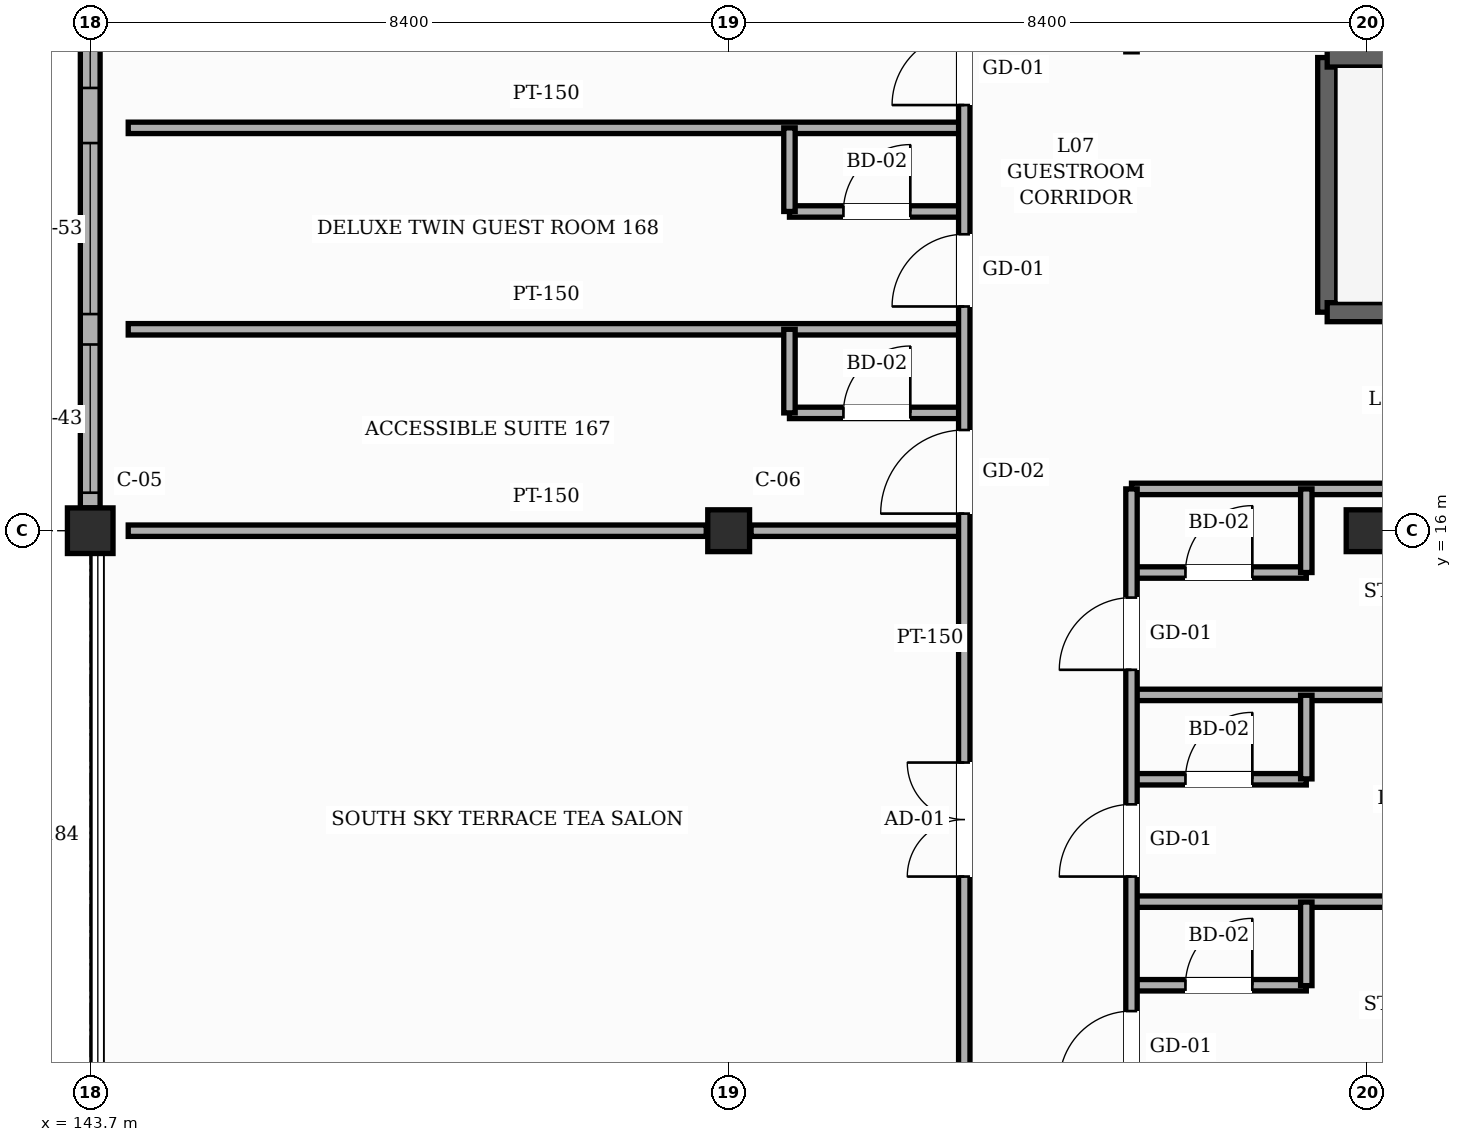
"""IFC4 building model, lengths in metres.
Left out: names, types, materials, properties, quantities, classifications, styles, units other than length and angle.
Written with IfcOpenShell. Run it as: python <this file> out.ifc"""

import sys

from ifc_helpers import new_model, si_unit, direction, frame, frame_2d, origin, origin_2d, place, context, subcontext, project, spatial, rectangle, hollow_rectangle, extrude, element, fill, save


model = new_model("IFC4")
c1 = context("Model", 3, precision=1e-05, world=origin(), true_north=direction((0.0, 1.0)))
c2 = subcontext(c1, "Body", "Model", "MODEL_VIEW")
j1 = project(units=[si_unit("LENGTHUNIT", "METRE"), si_unit("PLANEANGLEUNIT", "RADIAN")], contexts=[c1])
p1 = place(None, origin())
s1 = spatial("IfcSite", under=j1, at=p1, CompositionType="ELEMENT")
p2 = place(p1, origin())
s2 = spatial("IfcBuilding", under=s1, at=p2, CompositionType="ELEMENT")
p3 = place(p2, frame((0.0, 0.0, 31.8)))
s3 = spatial("IfcBuildingStorey", under=s2, at=p3, CompositionType="ELEMENT", Elevation=31.8)
p4 = place(p3, frame((143.7, 16.0, 0.0), z_axis=(0.0, 0.0, 1.0), x_axis=(1.0, 0.0, 0.0)))
e1 = element("IfcColumn", 1, at=p4, inside=s3, PredefinedType="COLUMN", context=c2, shape_type="SweptSolid", body=[
    extrude(hollow_rectangle(XDim=0.6, YDim=0.6, WallThickness=0.025, InnerFilletRadius=0.025, OuterFilletRadius=0.05, at=origin_2d()), origin(), (0.0, 0.0, 1.0), 3.6),
])
for number, where, z_axis, x_axis in (
    (2, (152.1, 16.0, 0.0), (0.0, 0.0, 1.0), (1.0, 0.0, 0.0)),
    (3, (160.5, 16.0, 0.0), (0.0, 0.0, 1.0), (1.0, 0.0, 0.0)),
):
    element("IfcColumn", number, at=place(p3, frame(where, z_axis=z_axis, x_axis=x_axis)), inside=s3, PredefinedType="COLUMN", context=c2, shape_type="SweptSolid", body=[
        extrude(hollow_rectangle(XDim=0.55, YDim=0.55, WallThickness=0.022, InnerFilletRadius=0.022, OuterFilletRadius=0.044, at=origin_2d()), origin(), (0.0, 0.0, 1.0), 3.6),
    ])
p5 = place(p3, frame((143.7, 16.3, 0.0), z_axis=(0.0, 0.0, 1.0), x_axis=(0.0, 1.0, 0.0)))
e4 = element("IfcWall", 4, at=p5, inside=s3, PredefinedType="SOLIDWALL", context=c2, shape_type="SweptSolid", body=[
    extrude(rectangle(XDim=7.4, YDim=0.26, at=frame_2d((3.7, 0.0))), origin(), (0.0, 0.0, 1.0), 2.805),
])
p6 = place(p5, frame((0.2, 0.0, 0.85)))
e5 = element("IfcOpeningElement", 5, at=p6, cuts=e4, PredefinedType="OPENING", context=c2, shape_type="SweptSolid", body=[
    extrude(rectangle(XDim=1.95, YDim=1.65, at=frame_2d((0.975, 0.825))), frame((0.0, 0.14, 0.0), z_axis=(0.0, -1.0, 0.0), x_axis=(1.0, 0.0, 0.0)), (0.0, 0.0, 1.0), 0.28),
])
p7 = place(p5, frame((2.55, 0.0, 0.85)))
e6 = element("IfcOpeningElement", 6, at=p7, cuts=e4, PredefinedType="OPENING", context=c2, shape_type="SweptSolid", body=[
    extrude(rectangle(XDim=2.25, YDim=1.65, at=frame_2d((1.125, 0.825))), frame((0.0, 0.14, 0.0), z_axis=(0.0, -1.0, 0.0), x_axis=(1.0, 0.0, 0.0)), (0.0, 0.0, 1.0), 0.28),
])
p8 = place(p5, frame((5.525, 0.0, 0.85)))
e7 = element("IfcOpeningElement", 7, at=p8, cuts=e4, PredefinedType="OPENING", context=c2, shape_type="SweptSolid", body=[
    extrude(rectangle(XDim=1.35, YDim=1.35, at=frame_2d((0.675, 0.675))), frame((0.0, 0.14, 0.0), z_axis=(0.0, -1.0, 0.0), x_axis=(1.0, 0.0, 0.0)), (0.0, 0.0, 1.0), 0.28),
])
p9 = place(p3, frame((159.975, 18.875, 0.0), z_axis=(0.0, 0.0, 1.0), x_axis=(0.0, 1.0, 0.0)))
e8 = element("IfcWall", 8, at=p9, inside=s3, PredefinedType="SHEAR", context=c2, shape_type="SweptSolid", body=[
    extrude(rectangle(XDim=3.35, YDim=0.25, at=frame_2d((1.675, 0.0))), origin(), (0.0, 0.0, 1.0), 3.38),
])
p10 = place(p3, frame((159.975, 22.225, 0.0), z_axis=(0.0, 0.0, 1.0), x_axis=(1.0, 0.0, 0.0)))
e9 = element("IfcWall", 9, at=p10, inside=s3, PredefinedType="SHEAR", context=c2, shape_type="SweptSolid", body=[
    extrude(rectangle(XDim=7.9, YDim=0.25, at=frame_2d((3.95, 0.0))), origin(), (0.0, 0.0, 1.0), 3.38),
])
p11 = place(p10, frame((6.075, 0.0, 0.0)))
e10 = element("IfcOpeningElement", 10, at=p11, cuts=e9, PredefinedType="OPENING", context=c2, shape_type="SweptSolid", body=[
    extrude(rectangle(XDim=1.3, YDim=2.2, at=frame_2d((0.65, 1.1))), frame((0.0, 0.135, 0.0), z_axis=(0.0, -1.0, 0.0), x_axis=(1.0, 0.0, 0.0)), (0.0, 0.0, 1.0), 0.27),
])
p12 = place(p3, frame((167.875, 18.875, 0.0), z_axis=(0.0, 0.0, 1.0), x_axis=(-1.0, 0.0, 0.0)))
e11 = element("IfcWall", 11, at=p12, inside=s3, PredefinedType="SHEAR", context=c2, shape_type="SweptSolid", body=[
    extrude(rectangle(XDim=7.9, YDim=0.25, at=frame_2d((3.95, 0.0))), origin(), (0.0, 0.0, 1.0), 3.38),
])
p13 = place(p3, frame((157.4, 10.02, 0.0), z_axis=(0.0, 0.0, 1.0), x_axis=(1.0, 0.0, 0.0)))
e12 = element("IfcWall", 12, at=p13, inside=s3, PredefinedType="PARTITIONING", context=c2, shape_type="SweptSolid", body=[
    extrude(rectangle(XDim=2.3, YDim=0.15, at=frame_2d((1.15, 0.0))), origin(), (0.0, 0.0, 1.0), 3.365),
])
p14 = place(p13, frame((0.71, 0.0, 0.0)))
e13 = element("IfcOpeningElement", 13, at=p14, cuts=e12, PredefinedType="OPENING", context=c2, shape_type="SweptSolid", body=[
    extrude(rectangle(XDim=0.88, YDim=2.12, at=frame_2d((0.44, 1.06))), frame((0.0, 0.085, 0.0), z_axis=(0.0, -1.0, 0.0), x_axis=(1.0, 0.0, 0.0)), (0.0, 0.0, 1.0), 0.17),
])
p15 = place(p3, frame((157.4, 11.12, 0.0), z_axis=(0.0, 0.0, 1.0), x_axis=(1.0, 0.0, 0.0)))
e14 = element("IfcWall", 14, at=p15, inside=s3, PredefinedType="PARTITIONING", context=c2, shape_type="SweptSolid", body=[
    extrude(rectangle(XDim=9.8, YDim=0.15, at=frame_2d((4.9, 0.0))), origin(), (0.0, 0.0, 1.0), 3.365),
])
p16 = place(p3, frame((157.4, 12.73, 0.0), z_axis=(0.0, 0.0, 1.0), x_axis=(1.0, 0.0, 0.0)))
e15 = element("IfcWall", 15, at=p16, inside=s3, PredefinedType="PARTITIONING", context=c2, shape_type="SweptSolid", body=[
    extrude(rectangle(XDim=2.3, YDim=0.15, at=frame_2d((1.15, 0.0))), origin(), (0.0, 0.0, 1.0), 3.365),
])
p17 = place(p16, frame((0.71, 0.0, 0.0)))
e16 = element("IfcOpeningElement", 16, at=p17, cuts=e15, PredefinedType="OPENING", context=c2, shape_type="SweptSolid", body=[
    extrude(rectangle(XDim=0.88, YDim=2.12, at=frame_2d((0.44, 1.06))), frame((0.0, 0.085, 0.0), z_axis=(0.0, -1.0, 0.0), x_axis=(1.0, 0.0, 0.0)), (0.0, 0.0, 1.0), 0.17),
])
p18 = place(p3, frame((157.4, 13.84, 0.0), z_axis=(0.0, 0.0, 1.0), x_axis=(1.0, 0.0, 0.0)))
e17 = element("IfcWall", 17, at=p18, inside=s3, PredefinedType="PARTITIONING", context=c2, shape_type="SweptSolid", body=[
    extrude(rectangle(XDim=9.8, YDim=0.15, at=frame_2d((4.9, 0.0))), origin(), (0.0, 0.0, 1.0), 3.365),
])
p19 = place(p3, frame((157.4, 15.45, 0.0), z_axis=(0.0, 0.0, 1.0), x_axis=(1.0, 0.0, 0.0)))
e18 = element("IfcWall", 18, at=p19, inside=s3, PredefinedType="PARTITIONING", context=c2, shape_type="SweptSolid", body=[
    extrude(rectangle(XDim=2.3, YDim=0.15, at=frame_2d((1.15, 0.0))), origin(), (0.0, 0.0, 1.0), 3.365),
])
p20 = place(p19, frame((0.71, 0.0, 0.0)))
e19 = element("IfcOpeningElement", 19, at=p20, cuts=e18, PredefinedType="OPENING", context=c2, shape_type="SweptSolid", body=[
    extrude(rectangle(XDim=0.88, YDim=2.12, at=frame_2d((0.44, 1.06))), frame((0.0, 0.085, 0.0), z_axis=(0.0, -1.0, 0.0), x_axis=(1.0, 0.0, 0.0)), (0.0, 0.0, 1.0), 0.17),
])
p21 = place(p3, frame((144.2, 16.0, 0.0), z_axis=(0.0, 0.0, 1.0), x_axis=(1.0, 0.0, 0.0)))
e20 = element("IfcWall", 20, at=p21, inside=s3, PredefinedType="PARTITIONING", context=c2, shape_type="SweptSolid", body=[
    extrude(rectangle(XDim=7.605, YDim=0.15, at=frame_2d((3.802, 0.0))), origin(), (0.0, 0.0, 1.0), 2.755),
])
p22 = place(p3, frame((152.395, 16.0, 0.0), z_axis=(0.0, 0.0, 1.0), x_axis=(1.0, 0.0, 0.0)))
e21 = element("IfcWall", 21, at=p22, inside=s3, PredefinedType="PARTITIONING", context=c2, shape_type="SweptSolid", body=[
    extrude(rectangle(XDim=2.805, YDim=0.15, at=frame_2d((1.402, 0.0))), origin(), (0.0, 0.0, 1.0), 2.755),
])
p23 = place(p3, frame((157.4, 16.55, 0.0), z_axis=(0.0, 0.0, 1.0), x_axis=(1.0, 0.0, 0.0)))
e22 = element("IfcWall", 22, at=p23, inside=s3, PredefinedType="PARTITIONING", context=c2, shape_type="SweptSolid", body=[
    extrude(rectangle(XDim=9.8, YDim=0.15, at=frame_2d((4.9, 0.0))), origin(), (0.0, 0.0, 1.0), 3.365),
])
p24 = place(p3, frame((152.9, 17.55, 0.0), z_axis=(0.0, 0.0, 1.0), x_axis=(1.0, 0.0, 0.0)))
e23 = element("IfcWall", 23, at=p24, inside=s3, PredefinedType="PARTITIONING", context=c2, shape_type="SweptSolid", body=[
    extrude(rectangle(XDim=2.3, YDim=0.15, at=frame_2d((1.15, 0.0))), origin(), (0.0, 0.0, 1.0), 3.365),
])
p25 = place(p24, frame((0.71, 0.0, 0.0)))
e24 = element("IfcOpeningElement", 24, at=p25, cuts=e23, PredefinedType="OPENING", context=c2, shape_type="SweptSolid", body=[
    extrude(rectangle(XDim=0.88, YDim=2.12, at=frame_2d((0.44, 1.06))), frame((0.0, 0.085, 0.0), z_axis=(0.0, -1.0, 0.0), x_axis=(1.0, 0.0, 0.0)), (0.0, 0.0, 1.0), 0.17),
])
p26 = place(p3, frame((144.2, 18.65, 0.0), z_axis=(0.0, 0.0, 1.0), x_axis=(1.0, 0.0, 0.0)))
e25 = element("IfcWall", 25, at=p26, inside=s3, PredefinedType="PARTITIONING", context=c2, shape_type="SweptSolid", body=[
    extrude(rectangle(XDim=11.0, YDim=0.15, at=frame_2d((5.5, 0.0))), origin(), (0.0, 0.0, 1.0), 3.365),
])
p27 = place(p3, frame((152.9, 20.2, 0.0), z_axis=(0.0, 0.0, 1.0), x_axis=(1.0, 0.0, 0.0)))
e26 = element("IfcWall", 26, at=p27, inside=s3, PredefinedType="PARTITIONING", context=c2, shape_type="SweptSolid", body=[
    extrude(rectangle(XDim=2.3, YDim=0.15, at=frame_2d((1.15, 0.0))), origin(), (0.0, 0.0, 1.0), 3.365),
])
p28 = place(p27, frame((0.71, 0.0, 0.0)))
e27 = element("IfcOpeningElement", 27, at=p28, cuts=e26, PredefinedType="OPENING", context=c2, shape_type="SweptSolid", body=[
    extrude(rectangle(XDim=0.88, YDim=2.12, at=frame_2d((0.44, 1.06))), frame((0.0, 0.085, 0.0), z_axis=(0.0, -1.0, 0.0), x_axis=(1.0, 0.0, 0.0)), (0.0, 0.0, 1.0), 0.17),
])
p29 = place(p3, frame((144.2, 21.3, 0.0), z_axis=(0.0, 0.0, 1.0), x_axis=(1.0, 0.0, 0.0)))
e28 = element("IfcWall", 28, at=p29, inside=s3, PredefinedType="PARTITIONING", context=c2, shape_type="SweptSolid", body=[
    extrude(rectangle(XDim=11.0, YDim=0.15, at=frame_2d((5.5, 0.0))), origin(), (0.0, 0.0, 1.0), 3.365),
])
p30 = place(p3, frame((152.9, 17.55, 0.0), z_axis=(0.0, 0.0, 1.0), x_axis=(0.0, 1.0, 0.0)))
e29 = element("IfcWall", 29, at=p30, inside=s3, PredefinedType="PARTITIONING", context=c2, shape_type="SweptSolid", body=[
    extrude(rectangle(XDim=1.1, YDim=0.15, at=frame_2d((0.55, 0.0))), origin(), (0.0, 0.0, 1.0), 3.365),
])
p31 = place(p3, frame((152.9, 20.2, 0.0), z_axis=(0.0, 0.0, 1.0), x_axis=(0.0, 1.0, 0.0)))
e30 = element("IfcWall", 30, at=p31, inside=s3, PredefinedType="PARTITIONING", context=c2, shape_type="SweptSolid", body=[
    extrude(rectangle(XDim=1.1, YDim=0.15, at=frame_2d((0.55, 0.0))), origin(), (0.0, 0.0, 1.0), 3.365),
])
p32 = place(p3, frame((155.2, 8.4, 0.0), z_axis=(0.0, 0.0, 1.0), x_axis=(0.0, 1.0, 0.0)))
e31 = element("IfcWall", 31, at=p32, inside=s3, PredefinedType="PARTITIONING", context=c2, shape_type="SweptSolid", body=[
    extrude(rectangle(XDim=18.2, YDim=0.15, at=frame_2d((9.1, 0.0))), origin(), (0.0, 0.0, 1.0), 3.365),
])
p33 = place(p32, frame((3.05, 0.0, 0.0)))
e32 = element("IfcOpeningElement", 32, at=p33, cuts=e31, PredefinedType="OPENING", context=c2, shape_type="SweptSolid", body=[
    extrude(rectangle(XDim=1.5, YDim=2.3, at=frame_2d((0.75, 1.15))), frame((0.0, 0.085, 0.0), z_axis=(0.0, -1.0, 0.0), x_axis=(1.0, 0.0, 0.0)), (0.0, 0.0, 1.0), 0.17),
])
p34 = place(p32, frame((7.825, 0.0, 0.0)))
e33 = element("IfcOpeningElement", 33, at=p34, cuts=e31, PredefinedType="OPENING", context=c2, shape_type="SweptSolid", body=[
    extrude(rectangle(XDim=1.1, YDim=2.2, at=frame_2d((0.55, 1.1))), frame((0.0, 0.085, 0.0), z_axis=(0.0, -1.0, 0.0), x_axis=(1.0, 0.0, 0.0)), (0.0, 0.0, 1.0), 0.17),
])
p35 = place(p32, frame((10.55, 0.0, 0.0)))
e34 = element("IfcOpeningElement", 34, at=p35, cuts=e31, PredefinedType="OPENING", context=c2, shape_type="SweptSolid", body=[
    extrude(rectangle(XDim=0.95, YDim=2.15, at=frame_2d((0.475, 1.075))), frame((0.0, 0.085, 0.0), z_axis=(0.0, -1.0, 0.0), x_axis=(1.0, 0.0, 0.0)), (0.0, 0.0, 1.0), 0.17),
])
p36 = place(p32, frame((13.2, 0.0, 0.0)))
e35 = element("IfcOpeningElement", 35, at=p36, cuts=e31, PredefinedType="OPENING", context=c2, shape_type="SweptSolid", body=[
    extrude(rectangle(XDim=0.95, YDim=2.15, at=frame_2d((0.475, 1.075))), frame((0.0, 0.085, 0.0), z_axis=(0.0, -1.0, 0.0), x_axis=(1.0, 0.0, 0.0)), (0.0, 0.0, 1.0), 0.17),
])
p37 = place(p32, frame((15.85, 0.0, 0.0)))
e36 = element("IfcOpeningElement", 36, at=p37, cuts=e31, PredefinedType="OPENING", context=c2, shape_type="SweptSolid", body=[
    extrude(rectangle(XDim=0.95, YDim=2.15, at=frame_2d((0.475, 1.075))), frame((0.0, 0.085, 0.0), z_axis=(0.0, -1.0, 0.0), x_axis=(1.0, 0.0, 0.0)), (0.0, 0.0, 1.0), 0.17),
])
p38 = place(p3, frame((157.4, 8.4, 0.0), z_axis=(0.0, 0.0, 1.0), x_axis=(0.0, 1.0, 0.0)))
e37 = element("IfcWall", 37, at=p38, inside=s3, PredefinedType="PARTITIONING", context=c2, shape_type="SweptSolid", body=[
    extrude(rectangle(XDim=8.15, YDim=0.15, at=frame_2d((4.075, 0.0))), origin(), (0.0, 0.0, 1.0), 3.365),
])
p39 = place(p38, frame((0.33, 0.0, 0.0)))
e38 = element("IfcOpeningElement", 38, at=p39, cuts=e37, PredefinedType="OPENING", context=c2, shape_type="SweptSolid", body=[
    extrude(rectangle(XDim=0.95, YDim=2.15, at=frame_2d((0.475, 1.075))), frame((0.0, 0.085, 0.0), z_axis=(0.0, -1.0, 0.0), x_axis=(1.0, 0.0, 0.0)), (0.0, 0.0, 1.0), 0.17),
])
p40 = place(p38, frame((3.05, 0.0, 0.0)))
e39 = element("IfcOpeningElement", 39, at=p40, cuts=e37, PredefinedType="OPENING", context=c2, shape_type="SweptSolid", body=[
    extrude(rectangle(XDim=0.95, YDim=2.15, at=frame_2d((0.475, 1.075))), frame((0.0, 0.085, 0.0), z_axis=(0.0, -1.0, 0.0), x_axis=(1.0, 0.0, 0.0)), (0.0, 0.0, 1.0), 0.17),
])
p41 = place(p38, frame((5.77, 0.0, 0.0)))
e40 = element("IfcOpeningElement", 40, at=p41, cuts=e37, PredefinedType="OPENING", context=c2, shape_type="SweptSolid", body=[
    extrude(rectangle(XDim=0.95, YDim=2.15, at=frame_2d((0.475, 1.075))), frame((0.0, 0.085, 0.0), z_axis=(0.0, -1.0, 0.0), x_axis=(1.0, 0.0, 0.0)), (0.0, 0.0, 1.0), 0.17),
])
p42 = place(p3, frame((159.7, 10.015, 0.0), z_axis=(0.0, 0.0, 1.0), x_axis=(0.0, 1.0, 0.0)))
e41 = element("IfcWall", 41, at=p42, inside=s3, PredefinedType="PARTITIONING", context=c2, shape_type="SweptSolid", body=[
    extrude(rectangle(XDim=1.1, YDim=0.15, at=frame_2d((0.55, 0.0))), origin(), (0.0, 0.0, 1.0), 3.365),
])
p43 = place(p3, frame((159.7, 12.735, 0.0), z_axis=(0.0, 0.0, 1.0), x_axis=(0.0, 1.0, 0.0)))
e42 = element("IfcWall", 42, at=p43, inside=s3, PredefinedType="PARTITIONING", context=c2, shape_type="SweptSolid", body=[
    extrude(rectangle(XDim=1.1, YDim=0.15, at=frame_2d((0.55, 0.0))), origin(), (0.0, 0.0, 1.0), 3.365),
])
p44 = place(p3, frame((159.7, 15.45, 0.0), z_axis=(0.0, 0.0, 1.0), x_axis=(0.0, 1.0, 0.0)))
e43 = element("IfcWall", 43, at=p44, inside=s3, PredefinedType="PARTITIONING", context=c2, shape_type="SweptSolid", body=[
    extrude(rectangle(XDim=1.1, YDim=0.15, at=frame_2d((0.55, 0.0))), origin(), (0.0, 0.0, 1.0), 3.365),
])
p45 = place(p6, origin())
e44 = element("IfcWindow", 44, at=p45, inside=s3, PartitioningType="SINGLE_PANEL", PredefinedType="WINDOW", context=c2, shape_type="SweptSolid", body=[
    extrude(rectangle(XDim=1.95, YDim=1.65, at=frame_2d((0.975, 0.825))), frame((0.0, 0.03, 0.0), z_axis=(0.0, -1.0, 0.0), x_axis=(1.0, 0.0, 0.0)), (0.0, 0.0, 1.0), 0.06),
])
fill(e5, e44)
p46 = place(p7, origin())
e45 = element("IfcWindow", 45, at=p46, inside=s3, PartitioningType="SINGLE_PANEL", PredefinedType="WINDOW", context=c2, shape_type="SweptSolid", body=[
    extrude(rectangle(XDim=2.25, YDim=1.65, at=frame_2d((1.125, 0.825))), frame((0.0, 0.03, 0.0), z_axis=(0.0, -1.0, 0.0), x_axis=(1.0, 0.0, 0.0)), (0.0, 0.0, 1.0), 0.06),
])
fill(e6, e45)
p47 = place(p8, origin())
e46 = element("IfcWindow", 46, at=p47, inside=s3, PartitioningType="SINGLE_PANEL", PredefinedType="WINDOW", context=c2, shape_type="SweptSolid", body=[
    extrude(rectangle(XDim=1.35, YDim=1.35, at=frame_2d((0.675, 0.675))), frame((0.0, 0.03, 0.0), z_axis=(0.0, -1.0, 0.0), x_axis=(1.0, 0.0, 0.0)), (0.0, 0.0, 1.0), 0.06),
])
fill(e7, e46)
p48 = place(p33, origin())
e47 = element("IfcDoor", 47, at=p48, inside=s3, OperationType="DOUBLE_DOOR_SINGLE_SWING", PredefinedType="DOOR", context=c2, shape_type="SweptSolid", body=[
    extrude(rectangle(XDim=1.5, YDim=2.3, at=frame_2d((0.75, 1.15))), frame((0.0, 0.025, 0.0), z_axis=(0.0, -1.0, 0.0), x_axis=(1.0, 0.0, 0.0)), (0.0, 0.0, 1.0), 0.05),
])
fill(e32, e47)
p49 = place(p34, origin())
e48 = element("IfcDoor", 48, at=p49, inside=s3, OperationType="SINGLE_SWING_LEFT", PredefinedType="DOOR", context=c2, shape_type="SweptSolid", body=[
    extrude(rectangle(XDim=1.1, YDim=2.2, at=frame_2d((0.55, 1.1))), frame((0.0, 0.025, 0.0), z_axis=(0.0, -1.0, 0.0), x_axis=(1.0, 0.0, 0.0)), (0.0, 0.0, 1.0), 0.05),
])
fill(e33, e48)
p50 = place(p25, origin())
e49 = element("IfcDoor", 49, at=p50, inside=s3, OperationType="SINGLE_SWING_RIGHT", PredefinedType="DOOR", context=c2, shape_type="SweptSolid", body=[
    extrude(rectangle(XDim=0.88, YDim=2.12, at=frame_2d((0.44, 1.06))), frame((0.0, 0.025, 0.0), z_axis=(0.0, -1.0, 0.0), x_axis=(1.0, 0.0, 0.0)), (0.0, 0.0, 1.0), 0.05),
])
fill(e24, e49)
p51 = place(p35, origin())
e50 = element("IfcDoor", 50, at=p51, inside=s3, OperationType="SINGLE_SWING_LEFT", PredefinedType="DOOR", context=c2, shape_type="SweptSolid", body=[
    extrude(rectangle(XDim=0.95, YDim=2.15, at=frame_2d((0.475, 1.075))), frame((0.0, 0.025, 0.0), z_axis=(0.0, -1.0, 0.0), x_axis=(1.0, 0.0, 0.0)), (0.0, 0.0, 1.0), 0.05),
])
fill(e34, e50)
p52 = place(p28, origin())
e51 = element("IfcDoor", 51, at=p52, inside=s3, OperationType="SINGLE_SWING_RIGHT", PredefinedType="DOOR", context=c2, shape_type="SweptSolid", body=[
    extrude(rectangle(XDim=0.88, YDim=2.12, at=frame_2d((0.44, 1.06))), frame((0.0, 0.025, 0.0), z_axis=(0.0, -1.0, 0.0), x_axis=(1.0, 0.0, 0.0)), (0.0, 0.0, 1.0), 0.05),
])
fill(e27, e51)
p53 = place(p36, origin())
e52 = element("IfcDoor", 52, at=p53, inside=s3, OperationType="SINGLE_SWING_LEFT", PredefinedType="DOOR", context=c2, shape_type="SweptSolid", body=[
    extrude(rectangle(XDim=0.95, YDim=2.15, at=frame_2d((0.475, 1.075))), frame((0.0, 0.025, 0.0), z_axis=(0.0, -1.0, 0.0), x_axis=(1.0, 0.0, 0.0)), (0.0, 0.0, 1.0), 0.05),
])
fill(e35, e52)
p54 = place(p39, origin())
e53 = element("IfcDoor", 53, at=p54, inside=s3, OperationType="SINGLE_SWING_LEFT", PredefinedType="DOOR", context=c2, shape_type="SweptSolid", body=[
    extrude(rectangle(XDim=0.95, YDim=2.15, at=frame_2d((0.475, 1.075))), frame((0.0, 0.025, 0.0), z_axis=(0.0, -1.0, 0.0), x_axis=(1.0, 0.0, 0.0)), (0.0, 0.0, 1.0), 0.05),
])
fill(e38, e53)
p55 = place(p14, origin())
e54 = element("IfcDoor", 54, at=p55, inside=s3, OperationType="SINGLE_SWING_RIGHT", PredefinedType="DOOR", context=c2, shape_type="SweptSolid", body=[
    extrude(rectangle(XDim=0.88, YDim=2.12, at=frame_2d((0.44, 1.06))), frame((0.0, 0.025, 0.0), z_axis=(0.0, -1.0, 0.0), x_axis=(1.0, 0.0, 0.0)), (0.0, 0.0, 1.0), 0.05),
])
fill(e13, e54)
p56 = place(p40, origin())
e55 = element("IfcDoor", 55, at=p56, inside=s3, OperationType="SINGLE_SWING_LEFT", PredefinedType="DOOR", context=c2, shape_type="SweptSolid", body=[
    extrude(rectangle(XDim=0.95, YDim=2.15, at=frame_2d((0.475, 1.075))), frame((0.0, 0.025, 0.0), z_axis=(0.0, -1.0, 0.0), x_axis=(1.0, 0.0, 0.0)), (0.0, 0.0, 1.0), 0.05),
])
fill(e39, e55)
p57 = place(p17, origin())
e56 = element("IfcDoor", 56, at=p57, inside=s3, OperationType="SINGLE_SWING_RIGHT", PredefinedType="DOOR", context=c2, shape_type="SweptSolid", body=[
    extrude(rectangle(XDim=0.88, YDim=2.12, at=frame_2d((0.44, 1.06))), frame((0.0, 0.025, 0.0), z_axis=(0.0, -1.0, 0.0), x_axis=(1.0, 0.0, 0.0)), (0.0, 0.0, 1.0), 0.05),
])
fill(e16, e56)
p58 = place(p41, origin())
e57 = element("IfcDoor", 57, at=p58, inside=s3, OperationType="SINGLE_SWING_LEFT", PredefinedType="DOOR", context=c2, shape_type="SweptSolid", body=[
    extrude(rectangle(XDim=0.95, YDim=2.15, at=frame_2d((0.475, 1.075))), frame((0.0, 0.025, 0.0), z_axis=(0.0, -1.0, 0.0), x_axis=(1.0, 0.0, 0.0)), (0.0, 0.0, 1.0), 0.05),
])
fill(e40, e57)
p59 = place(p20, origin())
e58 = element("IfcDoor", 58, at=p59, inside=s3, OperationType="SINGLE_SWING_RIGHT", PredefinedType="DOOR", context=c2, shape_type="SweptSolid", body=[
    extrude(rectangle(XDim=0.88, YDim=2.12, at=frame_2d((0.44, 1.06))), frame((0.0, 0.025, 0.0), z_axis=(0.0, -1.0, 0.0), x_axis=(1.0, 0.0, 0.0)), (0.0, 0.0, 1.0), 0.05),
])
fill(e19, e58)
save(model, sys.argv[1])
